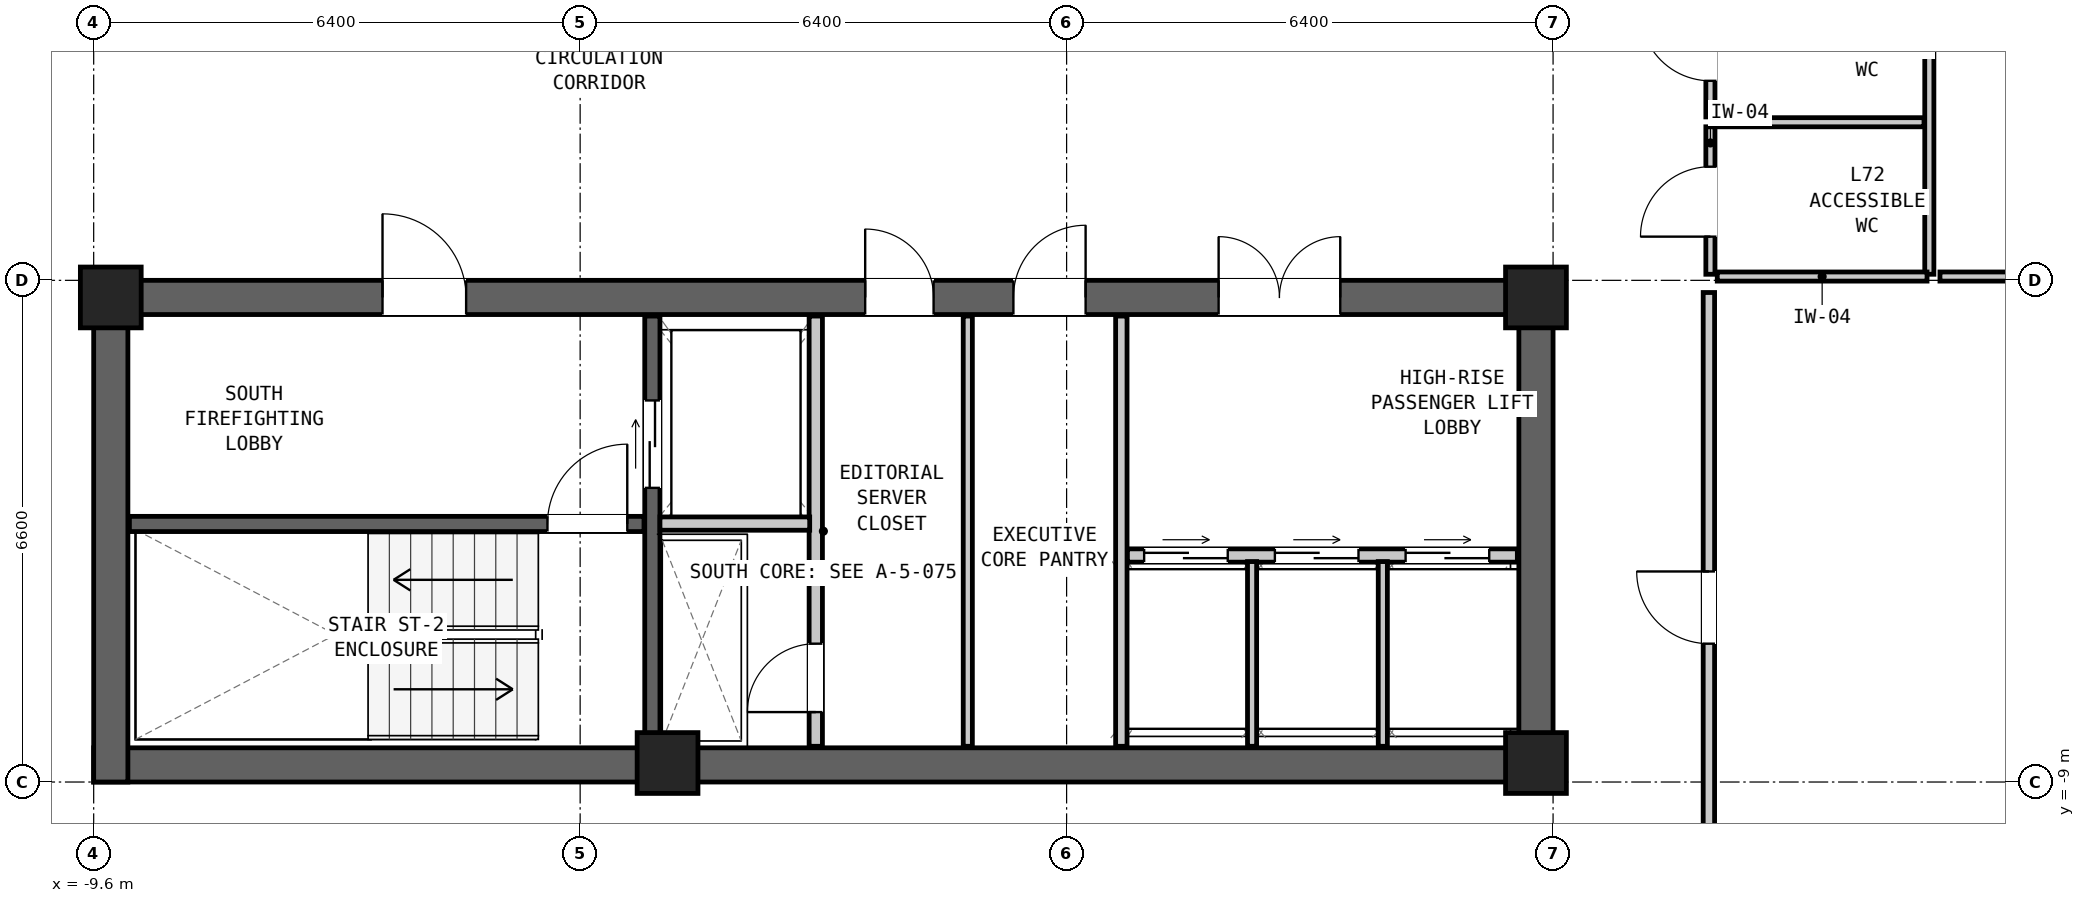
"""IFC4 building model, lengths in metres.
Left out: names, types, materials, properties, quantities, classifications, styles, units other than length and angle.
Written with IfcOpenShell. Run it as: python <this file> out.ifc"""

import sys

from ifc_helpers import new_model, si_unit, direction, frame, frame_2d, origin, origin_2d, place, context, subcontext, project, spatial, rectangle, extrude, element, fill, save


model = new_model("IFC4")
c1 = context("Model", 3, precision=1e-05, world=origin(), true_north=direction((0.0, 1.0)))
c2 = subcontext(c1, "Body", "Model", "MODEL_VIEW")
j1 = project(units=[si_unit("LENGTHUNIT", "METRE"), si_unit("PLANEANGLEUNIT", "RADIAN")], contexts=[c1])
p1 = place(None, origin())
s1 = spatial("IfcSite", under=j1, at=p1, CompositionType="ELEMENT")
p2 = place(p1, origin())
s2 = spatial("IfcBuilding", under=s1, at=p2, CompositionType="ELEMENT")
p3 = place(p2, frame((0.0, 0.0, 245.9)))
s3 = spatial("IfcBuildingStorey", under=s2, at=p3, CompositionType="ELEMENT", Elevation=245.9)
p4 = place(p3, frame((-9.6, -8.775, 0.0), z_axis=(0.0, 0.0, 1.0), x_axis=(1.0, 0.0, 0.0)))
e1 = element("IfcWall", 1, at=p4, inside=s3, PredefinedType="SHEAR", context=c2, shape_type="SweptSolid", body=[
    extrude(rectangle(XDim=19.2, YDim=0.45, at=frame_2d((9.6, 0.0))), origin(), (0.0, 0.0, 1.0), 3.05),
])
p5 = place(p3, frame((-9.6, -2.625, 0.0), z_axis=(0.0, 0.0, 1.0), x_axis=(1.0, 0.0, 0.0)))
e2 = element("IfcWall", 2, at=p5, inside=s3, PredefinedType="SHEAR", context=c2, shape_type="SweptSolid", body=[
    extrude(rectangle(XDim=19.2, YDim=0.45, at=frame_2d((9.6, 0.0))), origin(), (0.0, 0.0, 1.0), 3.05),
])
p6 = place(p5, frame((3.8, 0.0, 0.0)))
e3 = element("IfcOpeningElement", 3, at=p6, cuts=e2, PredefinedType="OPENING", context=c2, shape_type="SweptSolid", body=[
    extrude(rectangle(XDim=1.1, YDim=2.08, at=frame_2d((0.55, 1.04))), frame((0.0, 0.237, 0.0), z_axis=(0.0, -1.0, 0.0), x_axis=(1.0, 0.0, 0.0)), (0.0, 0.0, 1.0), 0.474),
])
p7 = place(p5, frame((10.15, 0.0, 0.0)))
e4 = element("IfcOpeningElement", 4, at=p7, cuts=e2, PredefinedType="OPENING", context=c2, shape_type="SweptSolid", body=[
    extrude(rectangle(XDim=0.9, YDim=2.05, at=frame_2d((0.45, 1.025))), frame((0.0, 0.237, 0.0), z_axis=(0.0, -1.0, 0.0), x_axis=(1.0, 0.0, 0.0)), (0.0, 0.0, 1.0), 0.474),
])
p8 = place(p5, frame((12.1, 0.0, 0.0)))
e5 = element("IfcOpeningElement", 5, at=p8, cuts=e2, PredefinedType="OPENING", context=c2, shape_type="SweptSolid", body=[
    extrude(rectangle(XDim=0.95, YDim=2.1, at=frame_2d((0.475, 1.05))), frame((0.0, 0.237, 0.0), z_axis=(0.0, -1.0, 0.0), x_axis=(1.0, 0.0, 0.0)), (0.0, 0.0, 1.0), 0.474),
])
p9 = place(p5, frame((14.8, 0.0, 0.0)))
e6 = element("IfcOpeningElement", 6, at=p9, cuts=e2, PredefinedType="OPENING", context=c2, shape_type="SweptSolid", body=[
    extrude(rectangle(XDim=1.6, YDim=2.12, at=frame_2d((0.8, 1.06))), frame((0.0, 0.237, 0.0), z_axis=(0.0, -1.0, 0.0), x_axis=(1.0, 0.0, 0.0)), (0.0, 0.0, 1.0), 0.474),
])
for number, where, z_axis, x_axis in (
    (7, (-9.375, -9.0, 0.0), (0.0, 0.0, 1.0), (0.0, 1.0, 0.0)),
    (8, (9.375, -9.0, 0.0), (0.0, 0.0, 1.0), (0.0, 1.0, 0.0)),
):
    element("IfcWall", number, at=place(p3, frame(where, z_axis=z_axis, x_axis=x_axis)), inside=s3, PredefinedType="SHEAR", context=c2, shape_type="SweptSolid", body=[
        extrude(rectangle(XDim=6.6, YDim=0.45, at=frame_2d((3.3, 0.0))), origin(), (0.0, 0.0, 1.0), 3.05),
    ])
for number, where, z_axis, x_axis in (
    (9, (-9.375, -2.625, 0.0), (0.0, 0.0, 1.0), (1.0, 0.0, 0.0)),
    (10, (9.375, -2.625, 0.0), (0.0, 0.0, 1.0), (1.0, 0.0, 0.0)),
    (11, (-2.05, -8.75, 0.0), (0.0, 0.0, 1.0), (1.0, 0.0, 0.0)),
    (12, (9.375, -8.75, 0.0), (0.0, 0.0, 1.0), (1.0, 0.0, 0.0)),
):
    element("IfcColumn", number, at=place(p3, frame(where, z_axis=z_axis, x_axis=x_axis)), inside=s3, PredefinedType="COLUMN", context=c2, shape_type="SweptSolid", body=[
        extrude(rectangle(XDim=0.8, YDim=0.8, at=origin_2d()), origin(), (0.0, 0.0, 1.0), 3.05),
    ])
p10 = place(p3, frame((-9.13, -5.605, 0.0), z_axis=(0.0, 0.0, 1.0), x_axis=(1.0, 0.0, 0.0)))
e13 = element("IfcWall", 13, at=p10, inside=s3, PredefinedType="SHEAR", context=c2, shape_type="SweptSolid", body=[
    extrude(rectangle(XDim=6.77, YDim=0.2, at=frame_2d((3.385, 0.0))), origin(), (0.0, 0.0, 1.0), 2.86),
])
p11 = place(p10, frame((5.5, 0.0, 0.0)))
e14 = element("IfcOpeningElement", 14, at=p11, cuts=e13, PredefinedType="OPENING", context=c2, shape_type="SweptSolid", body=[
    extrude(rectangle(XDim=1.05, YDim=2.08, at=frame_2d((0.525, 1.04))), frame((0.0, 0.112, 0.0), z_axis=(0.0, -1.0, 0.0), x_axis=(1.0, 0.0, 0.0)), (0.0, 0.0, 1.0), 0.224),
])
p12 = place(p3, frame((-2.25, -8.53, 0.0), z_axis=(0.0, 0.0, 1.0), x_axis=(0.0, 1.0, 0.0)))
e15 = element("IfcWall", 15, at=p12, inside=s3, PredefinedType="SHEAR", context=c2, shape_type="SweptSolid", body=[
    extrude(rectangle(XDim=5.66, YDim=0.2, at=frame_2d((2.83, 0.0))), origin(), (0.0, 0.0, 1.0), 2.86),
])
p13 = place(p12, frame((3.4, 0.0, 0.0)))
e16 = element("IfcOpeningElement", 16, at=p13, cuts=e15, PredefinedType="OPENING", context=c2, shape_type="SweptSolid", body=[
    extrude(rectangle(XDim=1.15, YDim=2.08, at=frame_2d((0.575, 1.04))), frame((0.0, 0.112, 0.0), z_axis=(0.0, -1.0, 0.0), x_axis=(1.0, 0.0, 0.0)), (0.0, 0.0, 1.0), 0.224),
])
p14 = place(p3, frame((-0.1, -8.53, 0.0), z_axis=(0.0, 0.0, 1.0), x_axis=(0.0, 1.0, 0.0)))
e17 = element("IfcWall", 17, at=p14, inside=s3, PredefinedType="PARTITIONING", context=c2, shape_type="SweptSolid", body=[
    extrude(rectangle(XDim=5.66, YDim=0.175, at=frame_2d((2.83, 0.0))), origin(), (0.0, 0.0, 1.0), 2.86),
])
p15 = place(p14, frame((0.45, 0.0, 0.0)))
e18 = element("IfcOpeningElement", 18, at=p15, cuts=e17, PredefinedType="OPENING", context=c2, shape_type="SweptSolid", body=[
    extrude(rectangle(XDim=0.9, YDim=2.05, at=frame_2d((0.45, 1.025))), frame((0.0, 0.1, 0.0), z_axis=(0.0, -1.0, 0.0), x_axis=(1.0, 0.0, 0.0)), (0.0, 0.0, 1.0), 0.199),
])
p16 = place(p3, frame((-2.15, -5.6, 0.0), z_axis=(0.0, 0.0, 1.0), x_axis=(1.0, 0.0, 0.0)))
e19 = element("IfcWall", 19, at=p16, inside=s3, PredefinedType="PARTITIONING", context=c2, shape_type="SweptSolid", body=[
    extrude(rectangle(XDim=1.97, YDim=0.175, at=frame_2d((0.985, 0.0))), origin(), (0.0, 0.0, 1.0), 2.86),
])
p17 = place(p3, frame((3.92, -8.53, 0.0), z_axis=(0.0, 0.0, 1.0), x_axis=(0.0, 1.0, 0.0)))
e20 = element("IfcWall", 20, at=p17, inside=s3, PredefinedType="PARTITIONING", context=c2, shape_type="SweptSolid", body=[
    extrude(rectangle(XDim=5.66, YDim=0.15, at=frame_2d((2.83, 0.0))), origin(), (0.0, 0.0, 1.0), 2.86),
])
p18 = place(p3, frame((1.9, -8.53, 0.0), z_axis=(0.0, 0.0, 1.0), x_axis=(0.0, 1.0, 0.0)))
e21 = element("IfcWall", 21, at=p18, inside=s3, PredefinedType="PARTITIONING", context=c2, shape_type="SweptSolid", body=[
    extrude(rectangle(XDim=5.66, YDim=0.12, at=frame_2d((2.83, 0.0))), origin(), (0.0, 0.0, 1.0), 2.86),
])
p19 = place(p3, frame((4.0, -6.02, 0.0), z_axis=(0.0, 0.0, 1.0), x_axis=(1.0, 0.0, 0.0)))
e22 = element("IfcWall", 22, at=p19, inside=s3, PredefinedType="PARTITIONING", context=c2, shape_type="SweptSolid", body=[
    extrude(rectangle(XDim=5.13, YDim=0.175, at=frame_2d((2.565, 0.0))), origin(), (0.0, 0.0, 1.0), 2.86),
])
p20 = place(p19, frame((0.22, 0.0, 0.0)))
e23 = element("IfcOpeningElement", 23, at=p20, cuts=e22, PredefinedType="OPENING", context=c2, shape_type="SweptSolid", body=[
    extrude(rectangle(XDim=1.1, YDim=2.06, at=frame_2d((0.55, 1.03))), frame((0.0, 0.1, 0.0), z_axis=(0.0, -1.0, 0.0), x_axis=(1.0, 0.0, 0.0)), (0.0, 0.0, 1.0), 0.199),
])
p21 = place(p19, frame((1.94, 0.0, 0.0)))
e24 = element("IfcOpeningElement", 24, at=p21, cuts=e22, PredefinedType="OPENING", context=c2, shape_type="SweptSolid", body=[
    extrude(rectangle(XDim=1.1, YDim=2.06, at=frame_2d((0.55, 1.03))), frame((0.0, 0.1, 0.0), z_axis=(0.0, -1.0, 0.0), x_axis=(1.0, 0.0, 0.0)), (0.0, 0.0, 1.0), 0.199),
])
p22 = place(p19, frame((3.66, 0.0, 0.0)))
e25 = element("IfcOpeningElement", 25, at=p22, cuts=e22, PredefinedType="OPENING", context=c2, shape_type="SweptSolid", body=[
    extrude(rectangle(XDim=1.1, YDim=2.06, at=frame_2d((0.55, 1.03))), frame((0.0, 0.1, 0.0), z_axis=(0.0, -1.0, 0.0), x_axis=(1.0, 0.0, 0.0)), (0.0, 0.0, 1.0), 0.199),
])
for number, where, z_axis, x_axis in (
    (26, (5.64, -8.53, 0.0), (0.0, 0.0, 1.0), (0.0, 1.0, 0.0)),
    (27, (7.36, -8.53, 0.0), (0.0, 0.0, 1.0), (0.0, 1.0, 0.0)),
):
    element("IfcWall", number, at=place(p3, frame(where, z_axis=z_axis, x_axis=x_axis)), inside=s3, PredefinedType="PARTITIONING", context=c2, shape_type="SweptSolid", body=[
        extrude(rectangle(XDim=2.43, YDim=0.12, at=frame_2d((1.215, 0.0))), origin(), (0.0, 0.0, 1.0), 2.86),
    ])
p23 = place(p3, frame((11.67, -2.32, 0.0), z_axis=(0.0, 0.0, 1.0), x_axis=(0.0, 1.0, 0.0)))
e28 = element("IfcWall", 28, at=p23, inside=s3, PredefinedType="PARTITIONING", context=c2, shape_type="SweptSolid", body=[
    extrude(rectangle(XDim=1.94, YDim=0.12, at=frame_2d((0.97, 0.0))), origin(), (0.0, 0.0, 1.0), 2.86),
])
p24 = place(p23, frame((0.495, 0.0, 0.0)))
e29 = element("IfcOpeningElement", 29, at=p24, cuts=e28, PredefinedType="OPENING", context=c2, shape_type="SweptSolid", body=[
    extrude(rectangle(XDim=0.92, YDim=2.1, at=frame_2d((0.46, 1.05))), frame((0.0, 0.072, 0.0), z_axis=(0.0, -1.0, 0.0), x_axis=(1.0, 0.0, 0.0)), (0.0, 0.0, 1.0), 0.144),
])
p25 = place(p3, frame((11.67, -0.25, 0.0), z_axis=(0.0, 0.0, 1.0), x_axis=(0.0, 1.0, 0.0)))
e30 = element("IfcWall", 30, at=p25, inside=s3, PredefinedType="PARTITIONING", context=c2, shape_type="SweptSolid", body=[
    extrude(rectangle(XDim=1.9, YDim=0.12, at=frame_2d((0.95, 0.0))), origin(), (0.0, 0.0, 1.0), 2.86),
])
p26 = place(p25, frame((0.475, 0.0, 0.0)))
e31 = element("IfcOpeningElement", 31, at=p26, cuts=e30, PredefinedType="OPENING", context=c2, shape_type="SweptSolid", body=[
    extrude(rectangle(XDim=0.92, YDim=2.1, at=frame_2d((0.46, 1.05))), frame((0.0, 0.072, 0.0), z_axis=(0.0, -1.0, 0.0), x_axis=(1.0, 0.0, 0.0)), (0.0, 0.0, 1.0), 0.144),
])
p27 = place(p3, frame((14.55, -2.32, 0.0), z_axis=(0.0, 0.0, 1.0), x_axis=(0.0, 1.0, 0.0)))
e32 = element("IfcWall", 32, at=p27, inside=s3, PredefinedType="PARTITIONING", context=c2, shape_type="SweptSolid", body=[
    extrude(rectangle(XDim=5.93, YDim=0.12, at=frame_2d((2.965, 0.0))), origin(), (0.0, 0.0, 1.0), 2.86),
])
p28 = place(p3, frame((11.76, -2.35, 0.0), z_axis=(0.0, 0.0, 1.0), x_axis=(1.0, 0.0, 0.0)))
e33 = element("IfcWall", 33, at=p28, inside=s3, PredefinedType="PARTITIONING", context=c2, shape_type="SweptSolid", body=[
    extrude(rectangle(XDim=2.76, YDim=0.12, at=frame_2d((1.38, 0.0))), origin(), (0.0, 0.0, 1.0), 1.981),
])
p29 = place(p3, frame((11.76, -0.32, 0.0), z_axis=(0.0, 0.0, 1.0), x_axis=(1.0, 0.0, 0.0)))
e34 = element("IfcWall", 34, at=p29, inside=s3, PredefinedType="PARTITIONING", context=c2, shape_type="SweptSolid", body=[
    extrude(rectangle(XDim=2.72, YDim=0.12, at=frame_2d((1.36, 0.0))), origin(), (0.0, 0.0, 1.0), 2.86),
])
p30 = place(p3, frame((14.69, -2.35, 0.0), z_axis=(0.0, 0.0, 1.0), x_axis=(1.0, 0.0, 0.0)))
e35 = element("IfcWall", 35, at=p30, inside=s3, PredefinedType="PARTITIONING", context=c2, shape_type="SweptSolid", body=[
    extrude(rectangle(XDim=6.927, YDim=0.12, at=frame_2d((3.464, 0.0))), origin(), (0.0, 0.0, 1.0), 1.981),
])
p31 = place(p3, frame((11.65, -10.85, 0.0), z_axis=(0.0, 0.0, 1.0), x_axis=(0.0, 1.0, 0.0)))
e36 = element("IfcWall", 36, at=p31, inside=s3, PredefinedType="PARTITIONING", context=c2, shape_type="SweptSolid", body=[
    extrude(rectangle(XDim=8.29, YDim=0.15, at=frame_2d((4.145, 0.0))), origin(), (0.0, 0.0, 1.0), 2.86),
])
p32 = place(p31, frame((3.67, 0.0, 0.0)))
e37 = element("IfcOpeningElement", 37, at=p32, cuts=e36, PredefinedType="OPENING", context=c2, shape_type="SweptSolid", body=[
    extrude(rectangle(XDim=0.95, YDim=2.1, at=frame_2d((0.475, 1.05))), frame((0.0, 0.087, 0.0), z_axis=(0.0, -1.0, 0.0), x_axis=(1.0, 0.0, 0.0)), (0.0, 0.0, 1.0), 0.174),
])
p33 = place(p11, origin())
e38 = element("IfcDoor", 38, at=p33, inside=s3, OperationType="SINGLE_SWING_RIGHT", PredefinedType="DOOR", context=c2, shape_type="SweptSolid", body=[
    extrude(rectangle(XDim=1.05, YDim=2.08, at=frame_2d((0.525, 1.04))), frame((0.0, 0.025, 0.0), z_axis=(0.0, -1.0, 0.0), x_axis=(1.0, 0.0, 0.0)), (0.0, 0.0, 1.0), 0.05),
])
fill(e14, e38)
p34 = place(p6, origin())
e39 = element("IfcDoor", 39, at=p34, inside=s3, OperationType="SINGLE_SWING_LEFT", PredefinedType="DOOR", context=c2, shape_type="SweptSolid", body=[
    extrude(rectangle(XDim=1.1, YDim=2.08, at=frame_2d((0.55, 1.04))), frame((0.0, 0.025, 0.0), z_axis=(0.0, -1.0, 0.0), x_axis=(1.0, 0.0, 0.0)), (0.0, 0.0, 1.0), 0.05),
])
fill(e3, e39)
p35 = place(p13, origin())
e40 = element("IfcDoor", 40, at=p35, inside=s3, OperationType="DOUBLE_DOOR_SLIDING", PredefinedType="DOOR", context=c2, shape_type="SweptSolid", body=[
    extrude(rectangle(XDim=1.15, YDim=2.08, at=frame_2d((0.575, 1.04))), frame((0.0, 0.025, 0.0), z_axis=(0.0, -1.0, 0.0), x_axis=(1.0, 0.0, 0.0)), (0.0, 0.0, 1.0), 0.05),
])
fill(e16, e40)
p36 = place(p15, origin())
e41 = element("IfcDoor", 41, at=p36, inside=s3, OperationType="SINGLE_SWING_LEFT", PredefinedType="DOOR", context=c2, shape_type="SweptSolid", body=[
    extrude(rectangle(XDim=0.9, YDim=2.05, at=frame_2d((0.45, 1.025))), frame((0.0, 0.025, 0.0), z_axis=(0.0, -1.0, 0.0), x_axis=(1.0, 0.0, 0.0)), (0.0, 0.0, 1.0), 0.05),
])
fill(e18, e41)
p37 = place(p7, origin())
e42 = element("IfcDoor", 42, at=p37, inside=s3, OperationType="SINGLE_SWING_LEFT", PredefinedType="DOOR", context=c2, shape_type="SweptSolid", body=[
    extrude(rectangle(XDim=0.9, YDim=2.05, at=frame_2d((0.45, 1.025))), frame((0.0, 0.025, 0.0), z_axis=(0.0, -1.0, 0.0), x_axis=(1.0, 0.0, 0.0)), (0.0, 0.0, 1.0), 0.05),
])
fill(e4, e42)
p38 = place(p8, origin())
e43 = element("IfcDoor", 43, at=p38, inside=s3, OperationType="SINGLE_SWING_RIGHT", PredefinedType="DOOR", context=c2, shape_type="SweptSolid", body=[
    extrude(rectangle(XDim=0.95, YDim=2.1, at=frame_2d((0.475, 1.05))), frame((0.0, 0.025, 0.0), z_axis=(0.0, -1.0, 0.0), x_axis=(1.0, 0.0, 0.0)), (0.0, 0.0, 1.0), 0.05),
])
fill(e5, e43)
p39 = place(p20, origin())
e44 = element("IfcDoor", 44, at=p39, inside=s3, OperationType="DOUBLE_DOOR_SLIDING", PredefinedType="DOOR", context=c2, shape_type="SweptSolid", body=[
    extrude(rectangle(XDim=1.1, YDim=2.06, at=frame_2d((0.55, 1.03))), frame((0.0, 0.025, 0.0), z_axis=(0.0, -1.0, 0.0), x_axis=(1.0, 0.0, 0.0)), (0.0, 0.0, 1.0), 0.05),
])
fill(e23, e44)
p40 = place(p21, origin())
e45 = element("IfcDoor", 45, at=p40, inside=s3, OperationType="DOUBLE_DOOR_SLIDING", PredefinedType="DOOR", context=c2, shape_type="SweptSolid", body=[
    extrude(rectangle(XDim=1.1, YDim=2.06, at=frame_2d((0.55, 1.03))), frame((0.0, 0.025, 0.0), z_axis=(0.0, -1.0, 0.0), x_axis=(1.0, 0.0, 0.0)), (0.0, 0.0, 1.0), 0.05),
])
fill(e24, e45)
p41 = place(p22, origin())
e46 = element("IfcDoor", 46, at=p41, inside=s3, OperationType="DOUBLE_DOOR_SLIDING", PredefinedType="DOOR", context=c2, shape_type="SweptSolid", body=[
    extrude(rectangle(XDim=1.1, YDim=2.06, at=frame_2d((0.55, 1.03))), frame((0.0, 0.025, 0.0), z_axis=(0.0, -1.0, 0.0), x_axis=(1.0, 0.0, 0.0)), (0.0, 0.0, 1.0), 0.05),
])
fill(e25, e46)
p42 = place(p9, origin())
e47 = element("IfcDoor", 47, at=p42, inside=s3, OperationType="DOUBLE_DOOR_SINGLE_SWING", PredefinedType="DOOR", context=c2, shape_type="SweptSolid", body=[
    extrude(rectangle(XDim=1.6, YDim=2.12, at=frame_2d((0.8, 1.06))), frame((0.0, 0.025, 0.0), z_axis=(0.0, -1.0, 0.0), x_axis=(1.0, 0.0, 0.0)), (0.0, 0.0, 1.0), 0.05),
])
fill(e6, e47)
p43 = place(p24, origin())
e48 = element("IfcDoor", 48, at=p43, inside=s3, OperationType="SINGLE_SWING_LEFT", PredefinedType="DOOR", context=c2, shape_type="SweptSolid", body=[
    extrude(rectangle(XDim=0.92, YDim=2.1, at=frame_2d((0.46, 1.05))), frame((0.0, 0.025, 0.0), z_axis=(0.0, -1.0, 0.0), x_axis=(1.0, 0.0, 0.0)), (0.0, 0.0, 1.0), 0.05),
])
fill(e29, e48)
p44 = place(p26, origin())
e49 = element("IfcDoor", 49, at=p44, inside=s3, OperationType="SINGLE_SWING_RIGHT", PredefinedType="DOOR", context=c2, shape_type="SweptSolid", body=[
    extrude(rectangle(XDim=0.92, YDim=2.1, at=frame_2d((0.46, 1.05))), frame((0.0, 0.025, 0.0), z_axis=(0.0, -1.0, 0.0), x_axis=(1.0, 0.0, 0.0)), (0.0, 0.0, 1.0), 0.05),
])
fill(e31, e49)
p45 = place(p32, origin())
e50 = element("IfcDoor", 50, at=p45, inside=s3, OperationType="SINGLE_SWING_RIGHT", PredefinedType="DOOR", context=c2, shape_type="SweptSolid", body=[
    extrude(rectangle(XDim=0.95, YDim=2.1, at=frame_2d((0.475, 1.05))), frame((0.0, 0.025, 0.0), z_axis=(0.0, -1.0, 0.0), x_axis=(1.0, 0.0, 0.0)), (0.0, 0.0, 1.0), 0.05),
])
fill(e37, e50)
save(model, sys.argv[1])
